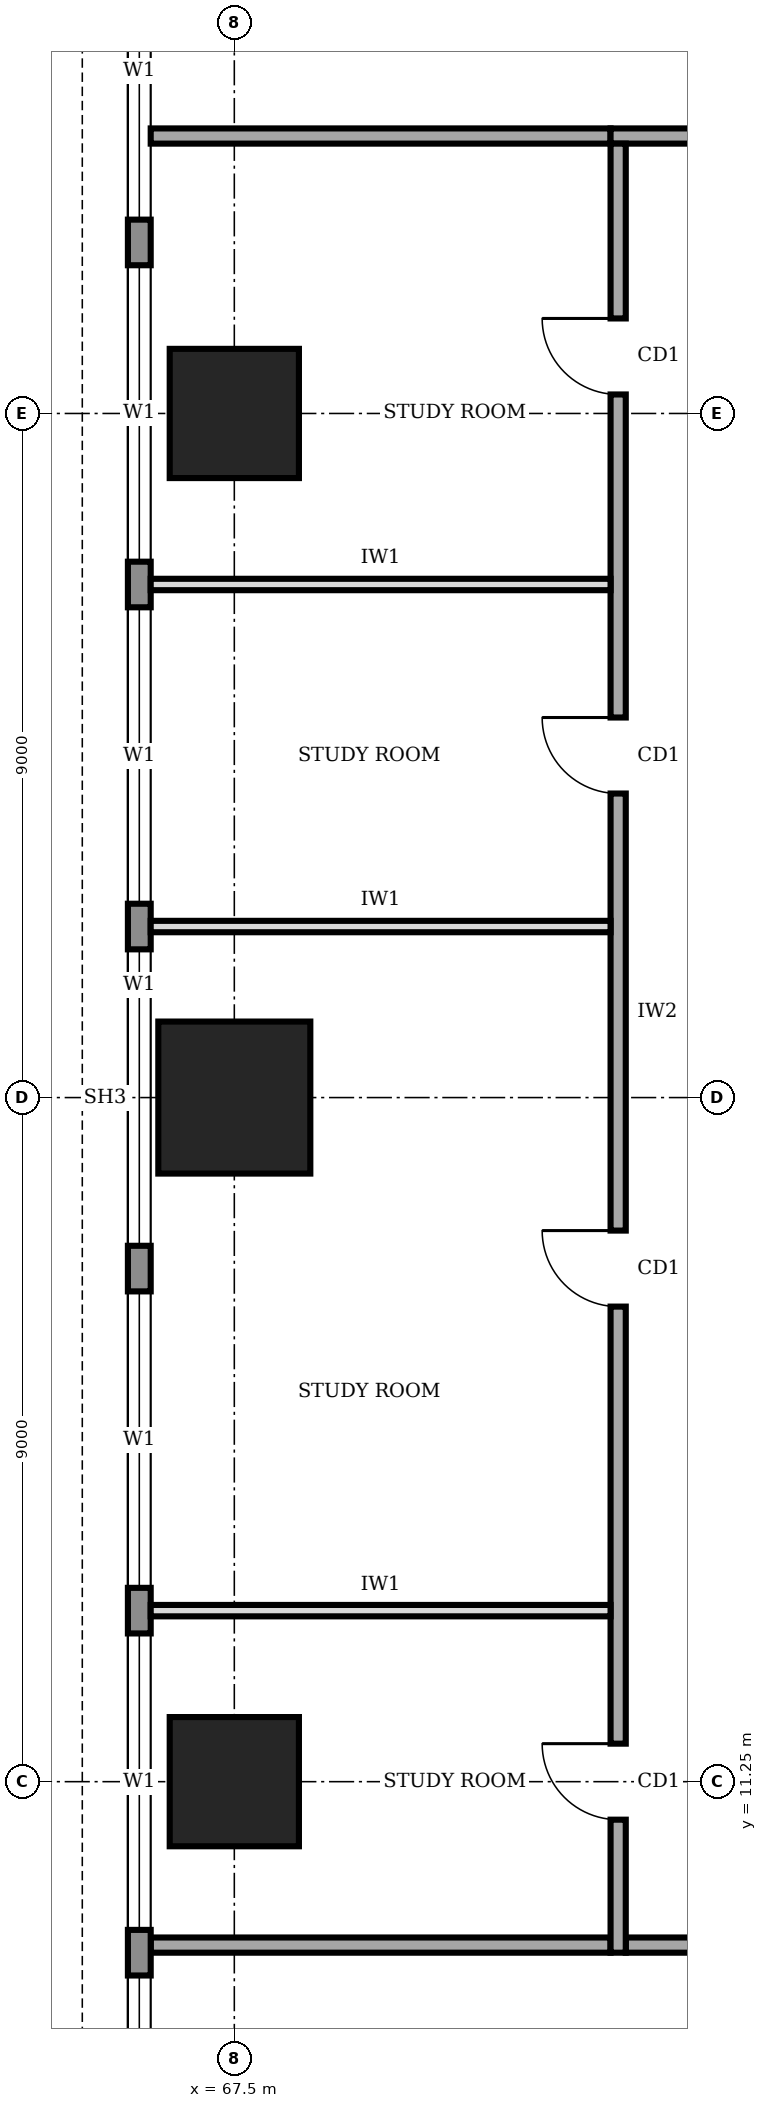
"""IFC4 building model, lengths in metres.
Left out: names, types, materials, properties, quantities, classifications, styles, units other than length and angle.
Written with IfcOpenShell. Run it as: python <this file> out.ifc"""

import sys

from ifc_helpers import new_model, si_unit, direction, frame, frame_2d, origin, origin_2d, place, context, subcontext, project, spatial, rectangle, extrude, element, fill, save


model = new_model("IFC4")
c1 = context("Model", 3, precision=1e-05, world=origin(), true_north=direction((0.0, 1.0)))
c2 = subcontext(c1, "Body", "Model", "MODEL_VIEW")
j1 = project(units=[si_unit("LENGTHUNIT", "METRE"), si_unit("PLANEANGLEUNIT", "RADIAN")], contexts=[c1])
p1 = place(None, origin())
s1 = spatial("IfcSite", under=j1, at=p1, CompositionType="ELEMENT")
p2 = place(p1, origin())
s2 = spatial("IfcBuilding", under=s1, at=p2, CompositionType="ELEMENT")
p3 = place(p2, frame((0.0, 0.0, 221.0)))
s3 = spatial("IfcBuildingStorey", under=s2, at=p3, CompositionType="ELEMENT", Elevation=221.0)
p4 = place(p3, frame((67.5, 11.25, 0.0), z_axis=(0.0, 0.0, 1.0), x_axis=(1.0, 0.0, 0.0)))
e1 = element("IfcColumn", 1, at=p4, inside=s3, PredefinedType="COLUMN", context=c2, shape_type="SweptSolid", body=[
    extrude(rectangle(XDim=1.7, YDim=1.7, at=origin_2d()), origin(), (0.0, 0.0, 1.0), 4.0),
])
p5 = place(p3, frame((67.5, 20.25, 0.0), z_axis=(0.0, 0.0, 1.0), x_axis=(1.0, 0.0, 0.0)))
e2 = element("IfcColumn", 2, at=p5, inside=s3, PredefinedType="COLUMN", context=c2, shape_type="SweptSolid", body=[
    extrude(rectangle(XDim=2.0, YDim=2.0, at=origin_2d()), origin(), (0.0, 0.0, 1.0), 4.0),
])
p6 = place(p3, frame((67.5, 29.25, 0.0), z_axis=(0.0, 0.0, 1.0), x_axis=(1.0, 0.0, 0.0)))
e3 = element("IfcColumn", 3, at=p6, inside=s3, PredefinedType="COLUMN", context=c2, shape_type="SweptSolid", body=[
    extrude(rectangle(XDim=1.7, YDim=1.7, at=origin_2d()), origin(), (0.0, 0.0, 1.0), 4.0),
])
p7 = place(p3, frame((66.25, 37.18, 0.0), z_axis=(0.0, 0.0, 1.0), x_axis=(0.0, -1.0, 0.0)))
e4 = element("IfcWall", 4, at=p7, inside=s3, PredefinedType="STANDARD", context=c2, shape_type="SweptSolid", body=[
    extrude(rectangle(XDim=33.86, YDim=0.3, at=frame_2d((16.93, 0.0))), origin(), (0.0, 0.0, 1.0), 3.75),
])
p8 = place(p7, frame((28.48, 0.0, 0.9)))
e5 = element("IfcOpeningElement", 5, at=p8, cuts=e4, PredefinedType="OPENING", context=c2, shape_type="SweptSolid", body=[
    extrude(rectangle(XDim=3.9, YDim=2.2, at=frame_2d((1.95, 1.1))), frame((0.0, 0.16, 0.0), z_axis=(0.0, -1.0, 0.0), x_axis=(1.0, 0.0, 0.0)), (0.0, 0.0, 1.0), 0.32),
])
p9 = place(p7, frame((23.98, 0.0, 0.9)))
e6 = element("IfcOpeningElement", 6, at=p9, cuts=e4, PredefinedType="OPENING", context=c2, shape_type="SweptSolid", body=[
    extrude(rectangle(XDim=3.9, YDim=2.2, at=frame_2d((1.95, 1.1))), frame((0.0, 0.16, 0.0), z_axis=(0.0, -1.0, 0.0), x_axis=(1.0, 0.0, 0.0)), (0.0, 0.0, 1.0), 0.32),
])
p10 = place(p7, frame((19.48, 0.0, 0.9)))
e7 = element("IfcOpeningElement", 7, at=p10, cuts=e4, PredefinedType="OPENING", context=c2, shape_type="SweptSolid", body=[
    extrude(rectangle(XDim=3.9, YDim=2.2, at=frame_2d((1.95, 1.1))), frame((0.0, 0.16, 0.0), z_axis=(0.0, -1.0, 0.0), x_axis=(1.0, 0.0, 0.0)), (0.0, 0.0, 1.0), 0.32),
])
p11 = place(p7, frame((14.98, 0.0, 0.9)))
e8 = element("IfcOpeningElement", 8, at=p11, cuts=e4, PredefinedType="OPENING", context=c2, shape_type="SweptSolid", body=[
    extrude(rectangle(XDim=3.9, YDim=2.2, at=frame_2d((1.95, 1.1))), frame((0.0, 0.16, 0.0), z_axis=(0.0, -1.0, 0.0), x_axis=(1.0, 0.0, 0.0)), (0.0, 0.0, 1.0), 0.32),
])
p12 = place(p7, frame((10.48, 0.0, 0.9)))
e9 = element("IfcOpeningElement", 9, at=p12, cuts=e4, PredefinedType="OPENING", context=c2, shape_type="SweptSolid", body=[
    extrude(rectangle(XDim=3.9, YDim=2.2, at=frame_2d((1.95, 1.1))), frame((0.0, 0.16, 0.0), z_axis=(0.0, -1.0, 0.0), x_axis=(1.0, 0.0, 0.0)), (0.0, 0.0, 1.0), 0.32),
])
p13 = place(p7, frame((5.98, 0.0, 0.9)))
e10 = element("IfcOpeningElement", 10, at=p13, cuts=e4, PredefinedType="OPENING", context=c2, shape_type="SweptSolid", body=[
    extrude(rectangle(XDim=3.9, YDim=2.2, at=frame_2d((1.95, 1.1))), frame((0.0, 0.16, 0.0), z_axis=(0.0, -1.0, 0.0), x_axis=(1.0, 0.0, 0.0)), (0.0, 0.0, 1.0), 0.32),
])
p14 = place(p7, frame((1.48, 0.0, 0.9)))
e11 = element("IfcOpeningElement", 11, at=p14, cuts=e4, PredefinedType="OPENING", context=c2, shape_type="SweptSolid", body=[
    extrude(rectangle(XDim=3.9, YDim=2.2, at=frame_2d((1.95, 1.1))), frame((0.0, 0.16, 0.0), z_axis=(0.0, -1.0, 0.0), x_axis=(1.0, 0.0, 0.0)), (0.0, 0.0, 1.0), 0.32),
])
p15 = place(p3, frame((72.65, 9.1, 0.0), z_axis=(0.0, 0.0, 1.0), x_axis=(1.0, 0.0, 0.0)))
e12 = element("IfcWall", 12, at=p15, inside=s3, PredefinedType="SOLIDWALL", context=c2, shape_type="SweptSolid", body=[
    extrude(rectangle(XDim=16.9, YDim=0.2, at=frame_2d((8.45, 0.0))), origin(), (0.0, 0.0, 1.0), 3.75),
])
p16 = place(p3, frame((89.35, 32.9, 0.0), z_axis=(0.0, 0.0, 1.0), x_axis=(-1.0, 0.0, 0.0)))
e13 = element("IfcWall", 13, at=p16, inside=s3, PredefinedType="SOLIDWALL", context=c2, shape_type="SweptSolid", body=[
    extrude(rectangle(XDim=16.9, YDim=0.2, at=frame_2d((8.45, 0.0))), origin(), (0.0, 0.0, 1.0), 3.75),
])
p17 = place(p16, frame((14.375, 0.0, 0.0)))
e14 = element("IfcOpeningElement", 14, at=p17, cuts=e13, PredefinedType="OPENING", context=c2, shape_type="SweptSolid", body=[
    extrude(rectangle(XDim=1.0, YDim=2.1, at=frame_2d((0.5, 1.05))), frame((0.0, 0.11, 0.0), z_axis=(0.0, -1.0, 0.0), x_axis=(1.0, 0.0, 0.0)), (0.0, 0.0, 1.0), 0.22),
])
p18 = place(p16, frame((1.325, 0.0, 0.0)))
e15 = element("IfcOpeningElement", 15, at=p18, cuts=e13, PredefinedType="OPENING", context=c2, shape_type="SweptSolid", body=[
    extrude(rectangle(XDim=1.0, YDim=2.1, at=frame_2d((0.5, 1.05))), frame((0.0, 0.11, 0.0), z_axis=(0.0, -1.0, 0.0), x_axis=(1.0, 0.0, 0.0)), (0.0, 0.0, 1.0), 0.22),
])
p19 = place(p3, frame((72.55, 32.8, 0.0), z_axis=(0.0, 0.0, 1.0), x_axis=(0.0, -1.0, 0.0)))
e16 = element("IfcWall", 16, at=p19, inside=s3, PredefinedType="SOLIDWALL", context=c2, shape_type="SweptSolid", body=[
    extrude(rectangle(XDim=23.8, YDim=0.2, at=frame_2d((11.9, 0.0))), origin(), (0.0, 0.0, 1.0), 3.75),
])
p20 = place(p19, frame((21.05, 0.0, 0.0)))
e17 = element("IfcOpeningElement", 17, at=p20, cuts=e16, PredefinedType="OPENING", context=c2, shape_type="SweptSolid", body=[
    extrude(rectangle(XDim=1.0, YDim=2.1, at=frame_2d((0.5, 1.05))), frame((0.0, 0.11, 0.0), z_axis=(0.0, -1.0, 0.0), x_axis=(1.0, 0.0, 0.0)), (0.0, 0.0, 1.0), 0.22),
])
p21 = place(p19, frame((14.3, 0.0, 0.0)))
e18 = element("IfcOpeningElement", 18, at=p21, cuts=e16, PredefinedType="OPENING", context=c2, shape_type="SweptSolid", body=[
    extrude(rectangle(XDim=1.0, YDim=2.1, at=frame_2d((0.5, 1.05))), frame((0.0, 0.11, 0.0), z_axis=(0.0, -1.0, 0.0), x_axis=(1.0, 0.0, 0.0)), (0.0, 0.0, 1.0), 0.22),
])
p22 = place(p19, frame((7.55, 0.0, 0.0)))
e19 = element("IfcOpeningElement", 19, at=p22, cuts=e16, PredefinedType="OPENING", context=c2, shape_type="SweptSolid", body=[
    extrude(rectangle(XDim=1.0, YDim=2.1, at=frame_2d((0.5, 1.05))), frame((0.0, 0.11, 0.0), z_axis=(0.0, -1.0, 0.0), x_axis=(1.0, 0.0, 0.0)), (0.0, 0.0, 1.0), 0.22),
])
p23 = place(p19, frame((2.3, 0.0, 0.0)))
e20 = element("IfcOpeningElement", 20, at=p23, cuts=e16, PredefinedType="OPENING", context=c2, shape_type="SweptSolid", body=[
    extrude(rectangle(XDim=1.0, YDim=2.1, at=frame_2d((0.5, 1.05))), frame((0.0, 0.11, 0.0), z_axis=(0.0, -1.0, 0.0), x_axis=(1.0, 0.0, 0.0)), (0.0, 0.0, 1.0), 0.22),
])
for number, where, z_axis, x_axis in (
    (21, (66.4, 9.1, 0.0), (0.0, 0.0, 1.0), (1.0, 0.0, 0.0)),
    (22, (66.4, 32.9, 0.0), (0.0, 0.0, 1.0), (1.0, 0.0, 0.0)),
):
    element("IfcWall", number, at=place(p3, frame(where, z_axis=z_axis, x_axis=x_axis)), inside=s3, PredefinedType="SOLIDWALL", context=c2, shape_type="SweptSolid", body=[
        extrude(rectangle(XDim=6.05, YDim=0.2, at=frame_2d((3.025, 0.0))), origin(), (0.0, 0.0, 1.0), 3.75),
    ])
for number, where, z_axis, x_axis in (
    (23, (66.4, 13.5, 0.0), (0.0, 0.0, 1.0), (1.0, 0.0, 0.0)),
    (24, (66.4, 22.5, 0.0), (0.0, 0.0, 1.0), (1.0, 0.0, 0.0)),
    (25, (66.4, 27.0, 0.0), (0.0, 0.0, 1.0), (1.0, 0.0, 0.0)),
):
    element("IfcWall", number, at=place(p3, frame(where, z_axis=z_axis, x_axis=x_axis)), inside=s3, PredefinedType="PARTITIONING", context=c2, shape_type="SweptSolid", body=[
        extrude(rectangle(XDim=6.05, YDim=0.15, at=frame_2d((3.025, 0.0))), origin(), (0.0, 0.0, 1.0), 3.75),
    ])
p24 = place(p8, origin())
e26 = element("IfcWindow", 26, at=p24, inside=s3, PartitioningType="SINGLE_PANEL", PredefinedType="WINDOW", context=c2, shape_type="SweptSolid", body=[
    extrude(rectangle(XDim=3.9, YDim=2.2, at=frame_2d((1.95, 1.1))), frame((0.0, 0.03, 0.0), z_axis=(0.0, -1.0, 0.0), x_axis=(1.0, 0.0, 0.0)), (0.0, 0.0, 1.0), 0.06),
])
fill(e5, e26)
p25 = place(p9, origin())
e27 = element("IfcWindow", 27, at=p25, inside=s3, PartitioningType="SINGLE_PANEL", PredefinedType="WINDOW", context=c2, shape_type="SweptSolid", body=[
    extrude(rectangle(XDim=3.9, YDim=2.2, at=frame_2d((1.95, 1.1))), frame((0.0, 0.03, 0.0), z_axis=(0.0, -1.0, 0.0), x_axis=(1.0, 0.0, 0.0)), (0.0, 0.0, 1.0), 0.06),
])
fill(e6, e27)
p26 = place(p10, origin())
e28 = element("IfcWindow", 28, at=p26, inside=s3, PartitioningType="SINGLE_PANEL", PredefinedType="WINDOW", context=c2, shape_type="SweptSolid", body=[
    extrude(rectangle(XDim=3.9, YDim=2.2, at=frame_2d((1.95, 1.1))), frame((0.0, 0.03, 0.0), z_axis=(0.0, -1.0, 0.0), x_axis=(1.0, 0.0, 0.0)), (0.0, 0.0, 1.0), 0.06),
])
fill(e7, e28)
p27 = place(p11, origin())
e29 = element("IfcWindow", 29, at=p27, inside=s3, PartitioningType="SINGLE_PANEL", PredefinedType="WINDOW", context=c2, shape_type="SweptSolid", body=[
    extrude(rectangle(XDim=3.9, YDim=2.2, at=frame_2d((1.95, 1.1))), frame((0.0, 0.03, 0.0), z_axis=(0.0, -1.0, 0.0), x_axis=(1.0, 0.0, 0.0)), (0.0, 0.0, 1.0), 0.06),
])
fill(e8, e29)
p28 = place(p12, origin())
e30 = element("IfcWindow", 30, at=p28, inside=s3, PartitioningType="SINGLE_PANEL", PredefinedType="WINDOW", context=c2, shape_type="SweptSolid", body=[
    extrude(rectangle(XDim=3.9, YDim=2.2, at=frame_2d((1.95, 1.1))), frame((0.0, 0.03, 0.0), z_axis=(0.0, -1.0, 0.0), x_axis=(1.0, 0.0, 0.0)), (0.0, 0.0, 1.0), 0.06),
])
fill(e9, e30)
p29 = place(p13, origin())
e31 = element("IfcWindow", 31, at=p29, inside=s3, PartitioningType="SINGLE_PANEL", PredefinedType="WINDOW", context=c2, shape_type="SweptSolid", body=[
    extrude(rectangle(XDim=3.9, YDim=2.2, at=frame_2d((1.95, 1.1))), frame((0.0, 0.03, 0.0), z_axis=(0.0, -1.0, 0.0), x_axis=(1.0, 0.0, 0.0)), (0.0, 0.0, 1.0), 0.06),
])
fill(e10, e31)
p30 = place(p14, origin())
e32 = element("IfcWindow", 32, at=p30, inside=s3, PartitioningType="SINGLE_PANEL", PredefinedType="WINDOW", context=c2, shape_type="SweptSolid", body=[
    extrude(rectangle(XDim=3.9, YDim=2.2, at=frame_2d((1.95, 1.1))), frame((0.0, 0.03, 0.0), z_axis=(0.0, -1.0, 0.0), x_axis=(1.0, 0.0, 0.0)), (0.0, 0.0, 1.0), 0.06),
])
fill(e11, e32)
p31 = place(p20, frame((1.0, 0.0, 0.0), z_axis=(0.0, 0.0, 1.0), x_axis=(-1.0, 0.0, 0.0)))
e33 = element("IfcDoor", 33, at=p31, inside=s3, OperationType="SINGLE_SWING_RIGHT", PredefinedType="DOOR", context=c2, shape_type="SweptSolid", body=[
    extrude(rectangle(XDim=1.0, YDim=2.1, at=frame_2d((0.5, 1.05))), frame((0.0, 0.025, 0.0), z_axis=(0.0, -1.0, 0.0), x_axis=(1.0, 0.0, 0.0)), (0.0, 0.0, 1.0), 0.05),
])
fill(e17, e33)
p32 = place(p21, frame((1.0, 0.0, 0.0), z_axis=(0.0, 0.0, 1.0), x_axis=(-1.0, 0.0, 0.0)))
e34 = element("IfcDoor", 34, at=p32, inside=s3, OperationType="SINGLE_SWING_RIGHT", PredefinedType="DOOR", context=c2, shape_type="SweptSolid", body=[
    extrude(rectangle(XDim=1.0, YDim=2.1, at=frame_2d((0.5, 1.05))), frame((0.0, 0.025, 0.0), z_axis=(0.0, -1.0, 0.0), x_axis=(1.0, 0.0, 0.0)), (0.0, 0.0, 1.0), 0.05),
])
fill(e18, e34)
p33 = place(p22, frame((1.0, 0.0, 0.0), z_axis=(0.0, 0.0, 1.0), x_axis=(-1.0, 0.0, 0.0)))
e35 = element("IfcDoor", 35, at=p33, inside=s3, OperationType="SINGLE_SWING_RIGHT", PredefinedType="DOOR", context=c2, shape_type="SweptSolid", body=[
    extrude(rectangle(XDim=1.0, YDim=2.1, at=frame_2d((0.5, 1.05))), frame((0.0, 0.025, 0.0), z_axis=(0.0, -1.0, 0.0), x_axis=(1.0, 0.0, 0.0)), (0.0, 0.0, 1.0), 0.05),
])
fill(e19, e35)
p34 = place(p23, frame((1.0, 0.0, 0.0), z_axis=(0.0, 0.0, 1.0), x_axis=(-1.0, 0.0, 0.0)))
e36 = element("IfcDoor", 36, at=p34, inside=s3, OperationType="SINGLE_SWING_RIGHT", PredefinedType="DOOR", context=c2, shape_type="SweptSolid", body=[
    extrude(rectangle(XDim=1.0, YDim=2.1, at=frame_2d((0.5, 1.05))), frame((0.0, 0.025, 0.0), z_axis=(0.0, -1.0, 0.0), x_axis=(1.0, 0.0, 0.0)), (0.0, 0.0, 1.0), 0.05),
])
fill(e20, e36)
save(model, sys.argv[1])
